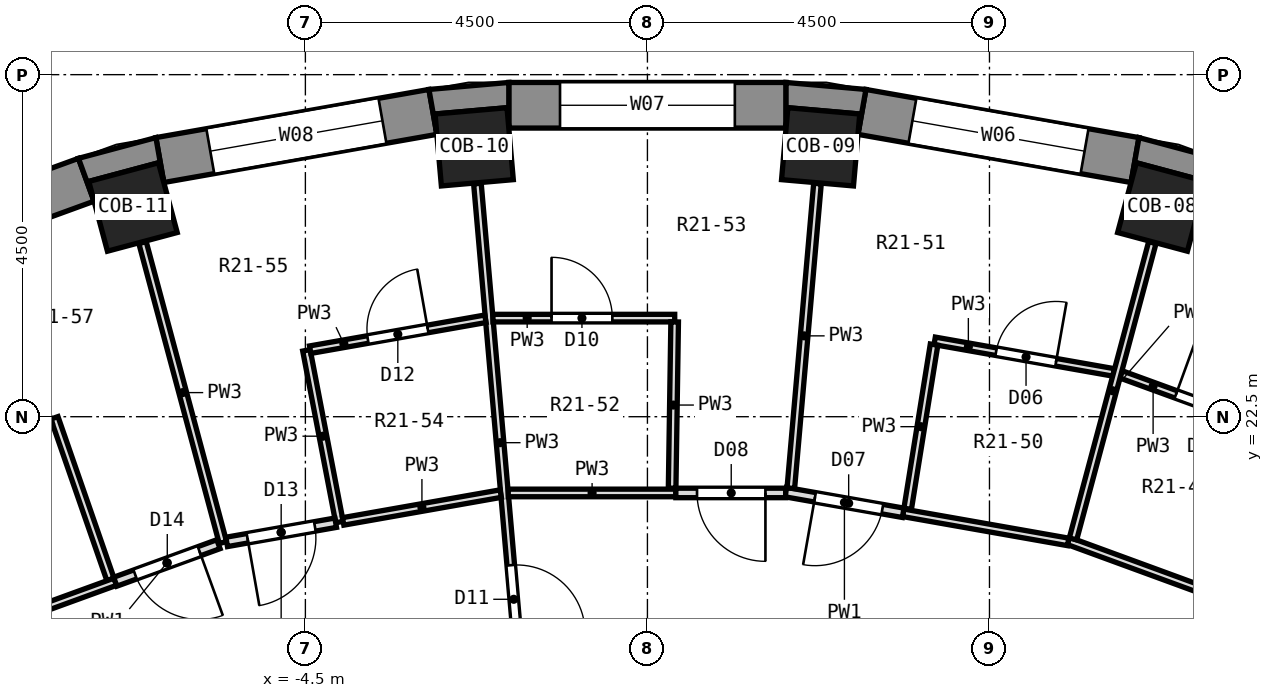
"""IFC4 building model, lengths in metres.
Left out: names, types, materials, properties, quantities, classifications, styles, units other than length and angle.
Written with IfcOpenShell. Run it as: python <this file> out.ifc"""

import sys

from ifc_helpers import new_model, si_unit, direction, frame, frame_2d, origin, origin_2d, place, context, subcontext, project, spatial, polyline, rectangle, outline, extrude, element, fill, save


model = new_model("IFC4")
c1 = context("Model", 3, precision=1e-05, world=origin(), true_north=direction((0.0, 1.0)))
c2 = subcontext(c1, "Body", "Model", "MODEL_VIEW")
j1 = project(units=[si_unit("LENGTHUNIT", "METRE"), si_unit("PLANEANGLEUNIT", "RADIAN")], contexts=[c1])
p1 = place(None, origin())
s1 = spatial("IfcSite", under=j1, at=p1, CompositionType="ELEMENT")
p2 = place(p1, origin())
s2 = spatial("IfcBuilding", under=s1, at=p2, CompositionType="ELEMENT")
p3 = place(p2, frame((0.0, 0.0, 131.5)))
s3 = spatial("IfcBuildingStorey", under=s2, at=p3, CompositionType="ELEMENT", Elevation=131.5)
for number, where, z_axis, x_axis in (
    (1, (6.768, 25.259, 0.0), (0.0, 0.0, 1.0), (0.259, 0.966, 0.0)),
    (2, (2.279, 26.051, 0.0), (0.0, 0.0, 1.0), (0.087, 0.996, 0.0)),
    (3, (-2.279, 26.051, 0.0), (0.0, 0.0, 1.0), (-0.087, 0.996, 0.0)),
    (4, (-6.768, 25.259, 0.0), (0.0, 0.0, 1.0), (-0.259, 0.966, 0.0)),
):
    element("IfcColumn", number, at=place(p3, frame(where, z_axis=z_axis, x_axis=x_axis)), inside=s3, PredefinedType="COLUMN", context=c2, shape_type="SweptSolid", body=[
        extrude(rectangle(XDim=0.95, YDim=0.95, at=origin_2d()), origin(), (0.0, 0.0, 1.0), 3.3),
    ])
p4 = place(p3, frame((6.415, 25.876, 0.0), z_axis=(0.0, 0.0, 1.0), x_axis=(-0.984803764455, 0.173670796382, 0.0)))
e5 = element("IfcWall", 5, at=p4, inside=s3, PredefinedType="SOLIDWALL", context=c2, shape_type="SweptSolid", body=[
    extrude(rectangle(XDim=3.648, YDim=0.6, at=frame_2d((1.824, 0.0))), origin(), (0.0, 0.0, 1.0), 2.8),
])
p5 = place(p4, frame((0.674, 0.0, 0.9)))
e6 = element("IfcOpeningElement", 6, at=p5, cuts=e5, PredefinedType="OPENING", context=c2, shape_type="SweptSolid", body=[
    extrude(rectangle(XDim=2.3, YDim=1.8, at=frame_2d((1.15, 0.9))), frame((0.0, 0.312, 0.0), z_axis=(0.0, -1.0, 0.0), x_axis=(1.0, 0.0, 0.0)), (0.0, 0.0, 1.0), 0.624),
])
p6 = place(p3, frame((1.824, 26.597, 0.0), z_axis=(0.0, 0.0, 1.0), x_axis=(-1.0, 0.0, 0.0)))
e7 = element("IfcWall", 7, at=p6, inside=s3, PredefinedType="SOLIDWALL", context=c2, shape_type="SweptSolid", body=[
    extrude(rectangle(XDim=3.648, YDim=0.6, at=frame_2d((1.824, 0.0))), origin(), (0.0, 0.0, 1.0), 2.8),
])
p7 = place(p6, frame((0.674, 0.0, 0.9)))
e8 = element("IfcOpeningElement", 8, at=p7, cuts=e7, PredefinedType="OPENING", context=c2, shape_type="SweptSolid", body=[
    extrude(rectangle(XDim=2.3, YDim=1.8, at=frame_2d((1.15, 0.9))), frame((0.0, 0.312, 0.0), z_axis=(0.0, -1.0, 0.0), x_axis=(1.0, 0.0, 0.0)), (0.0, 0.0, 1.0), 0.624),
])
p8 = place(p3, frame((-2.822, 26.51, 0.0), z_axis=(0.0, 0.0, 1.0), x_axis=(-0.984803764455, -0.173670796382, 0.0)))
e9 = element("IfcWall", 9, at=p8, inside=s3, PredefinedType="SOLIDWALL", context=c2, shape_type="SweptSolid", body=[
    extrude(rectangle(XDim=3.648, YDim=0.6, at=frame_2d((1.824, 0.0))), origin(), (0.0, 0.0, 1.0), 2.8),
])
p9 = place(p8, frame((0.674, 0.0, 0.9)))
e10 = element("IfcOpeningElement", 10, at=p9, cuts=e9, PredefinedType="OPENING", context=c2, shape_type="SweptSolid", body=[
    extrude(rectangle(XDim=2.3, YDim=1.8, at=frame_2d((1.15, 0.9))), frame((0.0, 0.312, 0.0), z_axis=(0.0, -1.0, 0.0), x_axis=(1.0, 0.0, 0.0)), (0.0, 0.0, 1.0), 0.624),
])
p10 = place(p3, frame((-7.383, 25.617, 0.0), z_axis=(0.0, 0.0, 1.0), x_axis=(-0.939703505393, -0.341990236633, 0.0)))
e11 = element("IfcWall", 11, at=p10, inside=s3, PredefinedType="SOLIDWALL", context=c2, shape_type="SweptSolid", body=[
    extrude(rectangle(XDim=3.648, YDim=0.6, at=frame_2d((1.824, 0.0))), origin(), (0.0, 0.0, 1.0), 2.8),
])
p11 = place(p10, frame((0.674, 0.0, 0.9)))
e12 = element("IfcOpeningElement", 12, at=p11, cuts=e11, PredefinedType="OPENING", context=c2, shape_type="SweptSolid", body=[
    extrude(rectangle(XDim=2.3, YDim=1.8, at=frame_2d((1.15, 0.9))), frame((0.0, 0.312, 0.0), z_axis=(0.0, -1.0, 0.0), x_axis=(1.0, 0.0, 0.0)), (0.0, 0.0, 1.0), 0.624),
])
p12 = place(p3, origin())
e13 = element("IfcWall", 13, at=p12, inside=s3, PredefinedType="SOLIDWALL", context=c2, shape_type="SweptSolid", body=[
    extrude(outline(polyline([(7.486, 25.899), (6.467, 26.172), (6.363, 25.581), (6.432, 25.841), (7.35, 25.595), (7.28, 25.335), (7.486, 25.899)])), origin(), (0.0, 0.0, 1.0), 2.8),
])
p13 = place(p3, origin())
e14 = element("IfcWall", 14, at=p13, inside=s3, PredefinedType="SOLIDWALL", context=c2, shape_type="SweptSolid", body=[
    extrude(outline(polyline([(2.875, 26.805), (1.824, 26.897), (1.824, 26.297), (1.847, 26.565), (2.794, 26.482), (2.77, 26.215), (2.875, 26.805)])), origin(), (0.0, 0.0, 1.0), 2.8),
])
p14 = place(p3, origin())
e15 = element("IfcWall", 15, at=p14, inside=s3, PredefinedType="SOLIDWALL", context=c2, shape_type="SweptSolid", body=[
    extrude(outline(polyline([(-2.875, 26.805), (-2.77, 26.215), (-2.794, 26.482), (-1.847, 26.565), (-1.824, 26.297), (-1.824, 26.897), (-2.875, 26.805)])), origin(), (0.0, 0.0, 1.0), 2.8),
])
p15 = place(p3, origin())
e16 = element("IfcWall", 16, at=p15, inside=s3, PredefinedType="SOLIDWALL", context=c2, shape_type="SweptSolid", body=[
    extrude(outline(polyline([(-6.467, 26.172), (-7.486, 25.899), (-7.28, 25.335), (-7.35, 25.595), (-6.432, 25.841), (-6.363, 25.581), (-6.467, 26.172)])), origin(), (0.0, 0.0, 1.0), 2.8),
])
p16 = place(p3, frame((-2.237, 25.567, 0.0), z_axis=(0.0, 0.0, 1.0), x_axis=(0.087068277691, -0.996202346424, 0.0)))
e17 = element("IfcWall", 17, at=p16, inside=s3, PredefinedType="PARTITIONING", context=c2, shape_type="SweptSolid", body=[
    extrude(rectangle(XDim=6.844, YDim=0.1, at=frame_2d((3.422, 0.0))), origin(), (0.0, 0.0, 1.0), 2.8),
])
p17 = place(p16, frame((5.04, 0.0, 0.0)))
e18 = element("IfcOpeningElement", 18, at=p17, cuts=e17, PredefinedType="OPENING", context=c2, shape_type="SweptSolid", body=[
    extrude(rectangle(XDim=0.9, YDim=2.1, at=frame_2d((0.45, 1.05))), frame((0.0, 0.062, 0.0), z_axis=(0.0, -1.0, 0.0), x_axis=(1.0, 0.0, 0.0)), (0.0, 0.0, 1.0), 0.124),
])
p18 = place(p3, frame((-4.486, 23.373, 0.0), z_axis=(0.0, 0.0, 1.0), x_axis=(0.188701744684, -0.982034445197, 0.0)))
e19 = element("IfcWall", 19, at=p18, inside=s3, PredefinedType="PARTITIONING", context=c2, shape_type="SweptSolid", body=[
    extrude(rectangle(XDim=2.3, YDim=0.1, at=frame_2d((1.15, 0.0))), origin(), (0.0, 0.0, 1.0), 2.8),
])
p19 = place(p3, frame((-6.642, 24.791, 0.0), z_axis=(0.0, 0.0, 1.0), x_axis=(0.258796817064, -0.965931782, 0.0)))
e20 = element("IfcWall", 20, at=p19, inside=s3, PredefinedType="PARTITIONING", context=c2, shape_type="SweptSolid", body=[
    extrude(rectangle(XDim=4.086, YDim=0.1, at=frame_2d((2.043, 0.0))), origin(), (0.0, 0.0, 1.0), 2.8),
])
p20 = place(p3, frame((-7.802, 22.485, 0.0), z_axis=(0.0, 0.0, 1.0), x_axis=(0.327758868129, -0.944761411343, 0.0)))
e21 = element("IfcWall", 21, at=p20, inside=s3, PredefinedType="PARTITIONING", context=c2, shape_type="SweptSolid", body=[
    extrude(rectangle(XDim=2.25, YDim=0.1, at=frame_2d((1.125, 0.0))), origin(), (0.0, 0.0, 1.0), 2.8),
])
p21 = place(p3, frame((5.538, 20.866, 0.0), z_axis=(0.0, 0.0, 1.0), x_axis=(0.939002837997, -0.343909392476, 0.0)))
e22 = element("IfcWall", 22, at=p21, inside=s3, PredefinedType="PARTITIONING", context=c2, shape_type="SweptSolid", body=[
    extrude(rectangle(XDim=2.306, YDim=0.1, at=frame_2d((1.153, 0.0))), origin(), (0.0, 0.0, 1.0), 2.8),
])
p22 = place(p3, frame((6.23, 23.057, 0.0), z_axis=(0.0, 0.0, 1.0), x_axis=(0.939644231496, -0.342153062556, 0.0)))
e23 = element("IfcWall", 23, at=p22, inside=s3, PredefinedType="PARTITIONING", context=c2, shape_type="SweptSolid", body=[
    extrude(rectangle(XDim=2.39, YDim=0.1, at=frame_2d((1.195, 0.0))), origin(), (0.0, 0.0, 1.0), 2.8),
])
p23 = place(p22, frame((0.77, 0.0, 0.0)))
e24 = element("IfcOpeningElement", 24, at=p23, cuts=e23, PredefinedType="OPENING", context=c2, shape_type="SweptSolid", body=[
    extrude(rectangle(XDim=0.8, YDim=2.1, at=frame_2d((0.4, 1.05))), frame((0.0, 0.062, 0.0), z_axis=(0.0, -1.0, 0.0), x_axis=(1.0, 0.0, 0.0)), (0.0, 0.0, 1.0), 0.124),
])
p24 = place(p3, frame((3.365, 21.236, 0.0), z_axis=(0.0, 0.0, 1.0), x_axis=(0.98480584975, -0.173658971256, 0.0)))
e25 = element("IfcWall", 25, at=p24, inside=s3, PredefinedType="PARTITIONING", context=c2, shape_type="SweptSolid", body=[
    extrude(rectangle(XDim=2.204, YDim=0.1, at=frame_2d((1.102, 0.0))), origin(), (0.0, 0.0, 1.0), 2.8),
])
p25 = place(p3, frame((1.819, 21.508, 0.0), z_axis=(0.0, 0.0, 1.0), x_axis=(0.984825798369, -0.17354580625, 0.0)))
e26 = element("IfcWall", 26, at=p25, inside=s3, PredefinedType="PARTITIONING", context=c2, shape_type="SweptSolid", body=[
    extrude(rectangle(XDim=1.57, YDim=0.125, at=frame_2d((0.785, 0.0))), origin(), (0.0, 0.0, 1.0), 2.8),
])
p26 = place(p25, frame((0.392, 0.0, 0.0)))
e27 = element("IfcOpeningElement", 27, at=p26, cuts=e26, PredefinedType="OPENING", context=c2, shape_type="SweptSolid", body=[
    extrude(rectangle(XDim=0.9, YDim=2.1, at=frame_2d((0.45, 1.05))), frame((0.0, 0.074, 0.0), z_axis=(0.0, -1.0, 0.0), x_axis=(1.0, 0.0, 0.0)), (0.0, 0.0, 1.0), 0.149),
])
p27 = place(p3, frame((3.779, 23.498, 0.0), z_axis=(0.0, 0.0, 1.0), x_axis=(0.984802055472, -0.173680486922, 0.0)))
e28 = element("IfcWall", 28, at=p27, inside=s3, PredefinedType="PARTITIONING", context=c2, shape_type="SweptSolid", body=[
    extrude(rectangle(XDim=2.391, YDim=0.1, at=frame_2d((1.196, 0.0))), origin(), (0.0, 0.0, 1.0), 2.8),
])
p28 = place(p27, frame((0.821, 0.0, 0.0)))
e29 = element("IfcOpeningElement", 29, at=p28, cuts=e28, PredefinedType="OPENING", context=c2, shape_type="SweptSolid", body=[
    extrude(rectangle(XDim=0.8, YDim=2.1, at=frame_2d((0.4, 1.05))), frame((0.0, 0.062, 0.0), z_axis=(0.0, -1.0, 0.0), x_axis=(1.0, 0.0, 0.0)), (0.0, 0.0, 1.0), 0.124),
])
p29 = place(p3, frame((-1.831, 21.497, 0.0), z_axis=(0.0, 0.0, 1.0), x_axis=(1.0, 0.0, 0.0)))
e30 = element("IfcWall", 30, at=p29, inside=s3, PredefinedType="PARTITIONING", context=c2, shape_type="SweptSolid", body=[
    extrude(rectangle(XDim=2.205, YDim=0.1, at=frame_2d((1.103, 0.0))), origin(), (0.0, 0.0, 1.0), 2.8),
])
p30 = place(p3, frame((0.374, 21.497, 0.0), z_axis=(0.0, 0.0, 1.0), x_axis=(1.0, 0.0, 0.0)))
e31 = element("IfcWall", 31, at=p30, inside=s3, PredefinedType="PARTITIONING", context=c2, shape_type="SweptSolid", body=[
    extrude(rectangle(XDim=1.445, YDim=0.125, at=frame_2d((0.722, 0.0))), origin(), (0.0, 0.0, 1.0), 2.8),
])
p31 = place(p30, frame((0.279, 0.0, 0.0)))
e32 = element("IfcOpeningElement", 32, at=p31, cuts=e31, PredefinedType="OPENING", context=c2, shape_type="SweptSolid", body=[
    extrude(rectangle(XDim=0.9, YDim=2.1, at=frame_2d((0.45, 1.05))), frame((0.0, 0.074, 0.0), z_axis=(0.0, -1.0, 0.0), x_axis=(1.0, 0.0, 0.0)), (0.0, 0.0, 1.0), 0.149),
])
p32 = place(p3, frame((-2.032, 23.797, 0.0), z_axis=(0.0, 0.0, 1.0), x_axis=(1.0, 0.0, 0.0)))
e33 = element("IfcWall", 33, at=p32, inside=s3, PredefinedType="PARTITIONING", context=c2, shape_type="SweptSolid", body=[
    extrude(rectangle(XDim=2.391, YDim=0.1, at=frame_2d((1.195, 0.0))), origin(), (0.0, 0.0, 1.0), 2.8),
])
p33 = place(p32, frame((0.771, 0.0, 0.0)))
e34 = element("IfcOpeningElement", 34, at=p33, cuts=e33, PredefinedType="OPENING", context=c2, shape_type="SweptSolid", body=[
    extrude(rectangle(XDim=0.8, YDim=2.1, at=frame_2d((0.4, 1.05))), frame((0.0, 0.062, 0.0), z_axis=(0.0, -1.0, 0.0), x_axis=(1.0, 0.0, 0.0)), (0.0, 0.0, 1.0), 0.124),
])
p34 = place(p3, frame((-4.003, 21.123, 0.0), z_axis=(0.0, 0.0, 1.0), x_axis=(0.984804573467, 0.173666208797, 0.0)))
e35 = element("IfcWall", 35, at=p34, inside=s3, PredefinedType="PARTITIONING", context=c2, shape_type="SweptSolid", body=[
    extrude(rectangle(XDim=2.104, YDim=0.1, at=frame_2d((1.052, 0.0))), origin(), (0.0, 0.0, 1.0), 2.8),
])
p35 = place(p3, frame((-5.536, 20.853, 0.0), z_axis=(0.0, 0.0, 1.0), x_axis=(0.984862774054, 0.173335848233, 0.0)))
e36 = element("IfcWall", 36, at=p35, inside=s3, PredefinedType="PARTITIONING", context=c2, shape_type="SweptSolid", body=[
    extrude(rectangle(XDim=1.456, YDim=0.125, at=frame_2d((0.728, 0.0))), origin(), (0.0, 0.0, 1.0), 2.8),
])
p36 = place(p35, frame((0.278, 0.0, 0.0)))
e37 = element("IfcOpeningElement", 37, at=p36, cuts=e36, PredefinedType="OPENING", context=c2, shape_type="SweptSolid", body=[
    extrude(rectangle(XDim=0.9, YDim=2.1, at=frame_2d((0.45, 1.05))), frame((0.0, 0.074, 0.0), z_axis=(0.0, -1.0, 0.0), x_axis=(1.0, 0.0, 0.0)), (0.0, 0.0, 1.0), 0.149),
])
p37 = place(p3, frame((-4.437, 23.382, 0.0), z_axis=(0.0, 0.0, 1.0), x_axis=(0.984790907087, 0.173743688574, 0.0)))
e38 = element("IfcWall", 38, at=p37, inside=s3, PredefinedType="PARTITIONING", context=c2, shape_type="SweptSolid", body=[
    extrude(rectangle(XDim=2.341, YDim=0.1, at=frame_2d((1.17, 0.0))), origin(), (0.0, 0.0, 1.0), 2.8),
])
p38 = place(p37, frame((0.771, 0.0, 0.0)))
e39 = element("IfcOpeningElement", 39, at=p38, cuts=e38, PredefinedType="OPENING", context=c2, shape_type="SweptSolid", body=[
    extrude(rectangle(XDim=0.8, YDim=2.1, at=frame_2d((0.4, 1.05))), frame((0.0, 0.062, 0.0), z_axis=(0.0, -1.0, 0.0), x_axis=(1.0, 0.0, 0.0)), (0.0, 0.0, 1.0), 0.124),
])
p39 = place(p3, frame((-9.073, 19.575, 0.0), z_axis=(0.0, 0.0, 1.0), x_axis=(0.939728749343, 0.341920864613, 0.0)))
e40 = element("IfcWall", 40, at=p39, inside=s3, PredefinedType="PARTITIONING", context=c2, shape_type="SweptSolid", body=[
    extrude(rectangle(XDim=2.205, YDim=0.1, at=frame_2d((1.103, 0.0))), origin(), (0.0, 0.0, 1.0), 2.8),
])
p40 = place(p3, frame((-7.001, 20.329, 0.0), z_axis=(0.0, 0.0, 1.0), x_axis=(0.939763804893, 0.341824503237, 0.0)))
e41 = element("IfcWall", 41, at=p40, inside=s3, PredefinedType="PARTITIONING", context=c2, shape_type="SweptSolid", body=[
    extrude(rectangle(XDim=1.444, YDim=0.125, at=frame_2d((0.722, 0.0))), origin(), (0.0, 0.0, 1.0), 2.8),
])
p41 = place(p40, frame((0.278, 0.0, 0.0)))
e42 = element("IfcOpeningElement", 42, at=p41, cuts=e41, PredefinedType="OPENING", context=c2, shape_type="SweptSolid", body=[
    extrude(rectangle(XDim=0.9, YDim=2.1, at=frame_2d((0.45, 1.05))), frame((0.0, 0.074, 0.0), z_axis=(0.0, -1.0, 0.0), x_axis=(1.0, 0.0, 0.0)), (0.0, 0.0, 1.0), 0.149),
])
p42 = place(p3, frame((-10.049, 21.667, 0.0), z_axis=(0.0, 0.0, 1.0), x_axis=(0.939662448837, 0.342103028699, 0.0)))
e43 = element("IfcWall", 43, at=p42, inside=s3, PredefinedType="PARTITIONING", context=c2, shape_type="SweptSolid", body=[
    extrude(rectangle(XDim=2.342, YDim=0.1, at=frame_2d((1.171, 0.0))), origin(), (0.0, 0.0, 1.0), 2.8),
])
p43 = place(p42, frame((0.771, 0.0, 0.0)))
e44 = element("IfcOpeningElement", 44, at=p43, cuts=e43, PredefinedType="OPENING", context=c2, shape_type="SweptSolid", body=[
    extrude(rectangle(XDim=0.8, YDim=2.1, at=frame_2d((0.4, 1.05))), frame((0.0, 0.062, 0.0), z_axis=(0.0, -1.0, 0.0), x_axis=(1.0, 0.0, 0.0)), (0.0, 0.0, 1.0), 0.124),
])
p44 = place(p3, frame((5.599, 20.892, 0.0), z_axis=(0.0, 0.0, 1.0), x_axis=(0.258615129659, 0.965980442199, 0.0)))
e45 = element("IfcWall", 45, at=p44, inside=s3, PredefinedType="PARTITIONING", context=c2, shape_type="SweptSolid", body=[
    extrude(rectangle(XDim=4.036, YDim=0.1, at=frame_2d((2.018, 0.0))), origin(), (0.0, 0.0, 1.0), 2.8),
])
p45 = place(p3, frame((3.424, 21.289, 0.0), z_axis=(0.0, 0.0, 1.0), x_axis=(0.158695579516, 0.987327561168, 0.0)))
e46 = element("IfcWall", 46, at=p45, inside=s3, PredefinedType="PARTITIONING", context=c2, shape_type="SweptSolid", body=[
    extrude(rectangle(XDim=2.188, YDim=0.1, at=frame_2d((1.094, 0.0))), origin(), (0.0, 0.0, 1.0), 2.8),
])
p46 = place(p3, frame((1.886, 21.559, 0.0), z_axis=(0.0, 0.0, 1.0), x_axis=(0.087137593131, 0.996196285811, 0.0)))
e47 = element("IfcWall", 47, at=p46, inside=s3, PredefinedType="PARTITIONING", context=c2, shape_type="SweptSolid", body=[
    extrude(rectangle(XDim=4.023, YDim=0.1, at=frame_2d((2.012, 0.0))), origin(), (0.0, 0.0, 1.0), 2.8),
])
p47 = place(p3, frame((0.325, 21.56, 0.0), z_axis=(0.0, 0.0, 1.0), x_axis=(0.015176823242, 0.999884825386, 0.0)))
e48 = element("IfcWall", 48, at=p47, inside=s3, PredefinedType="PARTITIONING", context=c2, shape_type="SweptSolid", body=[
    extrude(rectangle(XDim=2.188, YDim=0.1, at=frame_2d((1.094, 0.0))), origin(), (0.0, 0.0, 1.0), 2.8),
])
p48 = place(p5, origin())
e49 = element("IfcWindow", 49, at=p48, inside=s3, PartitioningType="SINGLE_PANEL", PredefinedType="WINDOW", context=c2, shape_type="SweptSolid", body=[
    extrude(rectangle(XDim=2.3, YDim=1.8, at=frame_2d((1.15, 0.9))), frame((0.0, 0.18, 0.0), z_axis=(0.0, -1.0, 0.0), x_axis=(1.0, 0.0, 0.0)), (0.0, 0.0, 1.0), 0.06),
])
fill(e6, e49)
p49 = place(p7, origin())
e50 = element("IfcWindow", 50, at=p49, inside=s3, PartitioningType="SINGLE_PANEL", PredefinedType="WINDOW", context=c2, shape_type="SweptSolid", body=[
    extrude(rectangle(XDim=2.3, YDim=1.8, at=frame_2d((1.15, 0.9))), frame((0.0, 0.18, 0.0), z_axis=(0.0, -1.0, 0.0), x_axis=(1.0, 0.0, 0.0)), (0.0, 0.0, 1.0), 0.06),
])
fill(e8, e50)
p50 = place(p9, origin())
e51 = element("IfcWindow", 51, at=p50, inside=s3, PartitioningType="SINGLE_PANEL", PredefinedType="WINDOW", context=c2, shape_type="SweptSolid", body=[
    extrude(rectangle(XDim=2.3, YDim=1.8, at=frame_2d((1.15, 0.9))), frame((0.0, 0.18, 0.0), z_axis=(0.0, -1.0, 0.0), x_axis=(1.0, 0.0, 0.0)), (0.0, 0.0, 1.0), 0.06),
])
fill(e10, e51)
p51 = place(p23, origin())
e52 = element("IfcDoor", 52, at=p51, inside=s3, OperationType="SINGLE_SWING_LEFT", PredefinedType="DOOR", context=c2, shape_type="SweptSolid", body=[
    extrude(rectangle(XDim=0.8, YDim=2.1, at=frame_2d((0.4, 1.05))), frame((0.0, 0.025, 0.0), z_axis=(0.0, -1.0, 0.0), x_axis=(1.0, 0.0, 0.0)), (0.0, 0.0, 1.0), 0.05),
])
fill(e24, e52)
p52 = place(p28, origin())
e53 = element("IfcDoor", 53, at=p52, inside=s3, OperationType="SINGLE_SWING_RIGHT", PredefinedType="DOOR", context=c2, shape_type="SweptSolid", body=[
    extrude(rectangle(XDim=0.8, YDim=2.1, at=frame_2d((0.4, 1.05))), frame((0.0, 0.025, 0.0), z_axis=(0.0, -1.0, 0.0), x_axis=(1.0, 0.0, 0.0)), (0.0, 0.0, 1.0), 0.05),
])
fill(e29, e53)
p53 = place(p26, frame((0.9, 0.0, 0.0), z_axis=(0.0, 0.0, 1.0), x_axis=(-1.0, 0.0, 0.0)))
e54 = element("IfcDoor", 54, at=p53, inside=s3, OperationType="SINGLE_SWING_RIGHT", PredefinedType="DOOR", context=c2, shape_type="SweptSolid", body=[
    extrude(rectangle(XDim=0.9, YDim=2.1, at=frame_2d((0.45, 1.05))), frame((0.0, 0.025, 0.0), z_axis=(0.0, -1.0, 0.0), x_axis=(1.0, 0.0, 0.0)), (0.0, 0.0, 1.0), 0.05),
])
fill(e27, e54)
p54 = place(p31, frame((0.9, 0.0, 0.0), z_axis=(0.0, 0.0, 1.0), x_axis=(-1.0, 0.0, 0.0)))
e55 = element("IfcDoor", 55, at=p54, inside=s3, OperationType="SINGLE_SWING_LEFT", PredefinedType="DOOR", context=c2, shape_type="SweptSolid", body=[
    extrude(rectangle(XDim=0.9, YDim=2.1, at=frame_2d((0.45, 1.05))), frame((0.0, 0.025, 0.0), z_axis=(0.0, -1.0, 0.0), x_axis=(1.0, 0.0, 0.0)), (0.0, 0.0, 1.0), 0.05),
])
fill(e32, e55)
p55 = place(p33, origin())
e56 = element("IfcDoor", 56, at=p55, inside=s3, OperationType="SINGLE_SWING_LEFT", PredefinedType="DOOR", context=c2, shape_type="SweptSolid", body=[
    extrude(rectangle(XDim=0.8, YDim=2.1, at=frame_2d((0.4, 1.05))), frame((0.0, 0.025, 0.0), z_axis=(0.0, -1.0, 0.0), x_axis=(1.0, 0.0, 0.0)), (0.0, 0.0, 1.0), 0.05),
])
fill(e34, e56)
p56 = place(p17, origin())
e57 = element("IfcDoor", 57, at=p56, inside=s3, OperationType="SINGLE_SWING_RIGHT", PredefinedType="DOOR", context=c2, shape_type="SweptSolid", body=[
    extrude(rectangle(XDim=0.9, YDim=2.1, at=frame_2d((0.45, 1.05))), frame((0.0, 0.025, 0.0), z_axis=(0.0, -1.0, 0.0), x_axis=(1.0, 0.0, 0.0)), (0.0, 0.0, 1.0), 0.05),
])
fill(e18, e57)
p57 = place(p38, origin())
e58 = element("IfcDoor", 58, at=p57, inside=s3, OperationType="SINGLE_SWING_RIGHT", PredefinedType="DOOR", context=c2, shape_type="SweptSolid", body=[
    extrude(rectangle(XDim=0.8, YDim=2.1, at=frame_2d((0.4, 1.05))), frame((0.0, 0.025, 0.0), z_axis=(0.0, -1.0, 0.0), x_axis=(1.0, 0.0, 0.0)), (0.0, 0.0, 1.0), 0.05),
])
fill(e39, e58)
p58 = place(p36, frame((0.9, 0.0, 0.0), z_axis=(0.0, 0.0, 1.0), x_axis=(-1.0, 0.0, 0.0)))
e59 = element("IfcDoor", 59, at=p58, inside=s3, OperationType="SINGLE_SWING_RIGHT", PredefinedType="DOOR", context=c2, shape_type="SweptSolid", body=[
    extrude(rectangle(XDim=0.9, YDim=2.1, at=frame_2d((0.45, 1.05))), frame((0.0, 0.025, 0.0), z_axis=(0.0, -1.0, 0.0), x_axis=(1.0, 0.0, 0.0)), (0.0, 0.0, 1.0), 0.05),
])
fill(e37, e59)
p59 = place(p41, frame((0.9, 0.0, 0.0), z_axis=(0.0, 0.0, 1.0), x_axis=(-1.0, 0.0, 0.0)))
e60 = element("IfcDoor", 60, at=p59, inside=s3, OperationType="SINGLE_SWING_LEFT", PredefinedType="DOOR", context=c2, shape_type="SweptSolid", body=[
    extrude(rectangle(XDim=0.9, YDim=2.1, at=frame_2d((0.45, 1.05))), frame((0.0, 0.025, 0.0), z_axis=(0.0, -1.0, 0.0), x_axis=(1.0, 0.0, 0.0)), (0.0, 0.0, 1.0), 0.05),
])
fill(e42, e60)
save(model, sys.argv[1])
